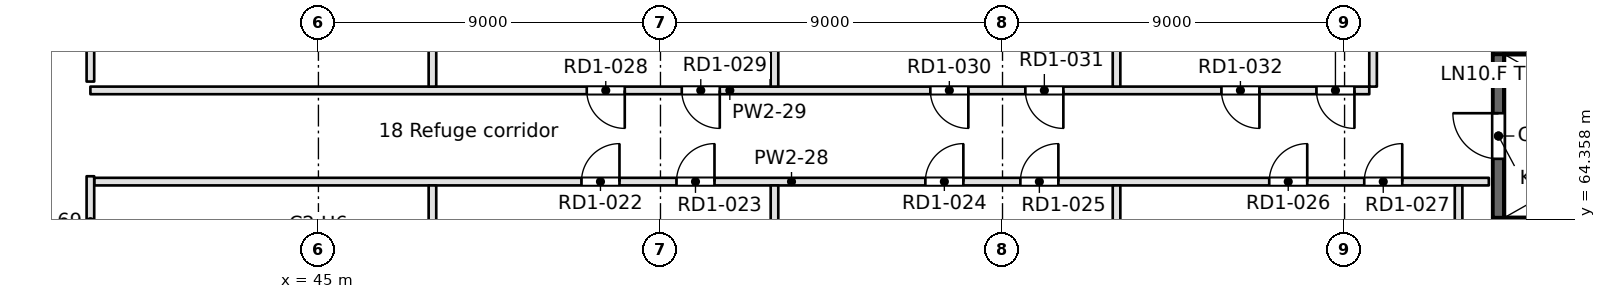
"""IFC4 building model, lengths in metres.
Left out: names, types, materials, properties, quantities, classifications, styles, units other than length and angle.
Written with IfcOpenShell. Run it as: python <this file> out.ifc"""

import sys

from ifc_helpers import new_model, si_unit, direction, frame, frame_2d, origin, place, context, subcontext, project, spatial, rectangle, extrude, element, fill, save


model = new_model("IFC4")
c1 = context("Model", 3, precision=1e-05, world=origin(), true_north=direction((0.0, 1.0)))
c2 = subcontext(c1, "Body", "Model", "MODEL_VIEW")
j1 = project(units=[si_unit("LENGTHUNIT", "METRE"), si_unit("PLANEANGLEUNIT", "RADIAN")], contexts=[c1])
p1 = place(None, origin())
s1 = spatial("IfcSite", under=j1, at=p1, CompositionType="ELEMENT")
p2 = place(p1, origin())
s2 = spatial("IfcBuilding", under=s1, at=p2, CompositionType="ELEMENT")
p3 = place(p2, frame((0.0, 0.0, 31.2)))
s3 = spatial("IfcBuildingStorey", under=s2, at=p3, CompositionType="ELEMENT", Elevation=31.2)
for number, where, z_axis, x_axis in (
    (1, (75.9, 64.25, -0.45), (0.0, 0.0, 1.0), (1.0, 0.0, 0.0)),
    (2, (75.9, 68.85, -0.45), (0.0, 0.0, 1.0), (1.0, 0.0, 0.0)),
):
    element("IfcWall", number, at=place(p3, frame(where, z_axis=z_axis, x_axis=x_axis)), inside=s3, PredefinedType="SOLIDWALL", context=c2, shape_type="SweptSolid", body=[
        extrude(rectangle(XDim=8.2, YDim=0.3, at=frame_2d((4.1, 0.0))), origin(), (0.0, 0.0, 1.0), 4.65),
    ])
p4 = place(p3, frame((76.05, 64.4, -0.45), z_axis=(0.0, 0.0, 1.0), x_axis=(0.0, 1.0, 0.0)))
e3 = element("IfcWall", 3, at=p4, inside=s3, PredefinedType="SOLIDWALL", context=c2, shape_type="SweptSolid", body=[
    extrude(rectangle(XDim=4.3, YDim=0.3, at=frame_2d((2.15, 0.0))), origin(), (0.0, 0.0, 1.0), 4.65),
])
p5 = place(p4, frame((1.55, 0.0, 0.45)))
e4 = element("IfcOpeningElement", 4, at=p5, cuts=e3, PredefinedType="OPENING", context=c2, shape_type="SweptSolid", body=[
    extrude(rectangle(XDim=1.2, YDim=2.1, at=frame_2d((0.6, 1.05))), frame((0.0, 0.15, 0.0), z_axis=(0.0, -1.0, 0.0), x_axis=(1.0, 0.0, 0.0)), (0.0, 0.0, 1.0), 0.3),
])
p6 = place(p3, frame((75.796, 65.35, 0.0), z_axis=(0.0, 0.0, 1.0), x_axis=(-1.0, 0.0, 0.0)))
e5 = element("IfcWall", 5, at=p6, inside=s3, PredefinedType="PARTITIONING", context=c2, shape_type="SweptSolid", body=[
    extrude(rectangle(XDim=36.696, YDim=0.2, at=frame_2d((18.348, 0.0))), origin(), (0.0, 0.0, 1.0), 4.2),
])
p7 = place(p6, frame((22.875, 0.0, 0.0)))
e6 = element("IfcOpeningElement", 6, at=p7, cuts=e5, PredefinedType="OPENING", context=c2, shape_type="SweptSolid", body=[
    extrude(rectangle(XDim=1.0, YDim=2.1, at=frame_2d((0.5, 1.05))), frame((0.0, 0.1, 0.0), z_axis=(0.0, -1.0, 0.0), x_axis=(1.0, 0.0, 0.0)), (0.0, 0.0, 1.0), 0.2),
])
p8 = place(p6, frame((20.375, 0.0, 0.0)))
e7 = element("IfcOpeningElement", 7, at=p8, cuts=e5, PredefinedType="OPENING", context=c2, shape_type="SweptSolid", body=[
    extrude(rectangle(XDim=1.0, YDim=2.1, at=frame_2d((0.5, 1.05))), frame((0.0, 0.1, 0.0), z_axis=(0.0, -1.0, 0.0), x_axis=(1.0, 0.0, 0.0)), (0.0, 0.0, 1.0), 0.2),
])
p9 = place(p6, frame((13.826, 0.0, 0.0)))
e8 = element("IfcOpeningElement", 8, at=p9, cuts=e5, PredefinedType="OPENING", context=c2, shape_type="SweptSolid", body=[
    extrude(rectangle(XDim=1.0, YDim=2.1, at=frame_2d((0.5, 1.05))), frame((0.0, 0.1, 0.0), z_axis=(0.0, -1.0, 0.0), x_axis=(1.0, 0.0, 0.0)), (0.0, 0.0, 1.0), 0.2),
])
p10 = place(p6, frame((11.326, 0.0, 0.0)))
e9 = element("IfcOpeningElement", 9, at=p10, cuts=e5, PredefinedType="OPENING", context=c2, shape_type="SweptSolid", body=[
    extrude(rectangle(XDim=1.0, YDim=2.1, at=frame_2d((0.5, 1.05))), frame((0.0, 0.1, 0.0), z_axis=(0.0, -1.0, 0.0), x_axis=(1.0, 0.0, 0.0)), (0.0, 0.0, 1.0), 0.2),
])
p11 = place(p6, frame((4.778, 0.0, 0.0)))
e10 = element("IfcOpeningElement", 10, at=p11, cuts=e5, PredefinedType="OPENING", context=c2, shape_type="SweptSolid", body=[
    extrude(rectangle(XDim=1.0, YDim=2.1, at=frame_2d((0.5, 1.05))), frame((0.0, 0.1, 0.0), z_axis=(0.0, -1.0, 0.0), x_axis=(1.0, 0.0, 0.0)), (0.0, 0.0, 1.0), 0.2),
])
p12 = place(p6, frame((2.278, 0.0, 0.0)))
e11 = element("IfcOpeningElement", 11, at=p12, cuts=e5, PredefinedType="OPENING", context=c2, shape_type="SweptSolid", body=[
    extrude(rectangle(XDim=1.0, YDim=2.1, at=frame_2d((0.5, 1.05))), frame((0.0, 0.1, 0.0), z_axis=(0.0, -1.0, 0.0), x_axis=(1.0, 0.0, 0.0)), (0.0, 0.0, 1.0), 0.2),
])
p13 = place(p3, frame((39.0, 67.75, 0.0), z_axis=(0.0, 0.0, 1.0), x_axis=(1.0, 0.0, 0.0)))
e12 = element("IfcWall", 12, at=p13, inside=s3, PredefinedType="PARTITIONING", context=c2, shape_type="SweptSolid", body=[
    extrude(rectangle(XDim=33.65, YDim=0.2, at=frame_2d((16.825, 0.0))), origin(), (0.0, 0.0, 1.0), 4.2),
])
p14 = place(p13, frame((13.06, 0.0, 0.0)))
e13 = element("IfcOpeningElement", 13, at=p14, cuts=e12, PredefinedType="OPENING", context=c2, shape_type="SweptSolid", body=[
    extrude(rectangle(XDim=1.0, YDim=2.1, at=frame_2d((0.5, 1.05))), frame((0.0, 0.1, 0.0), z_axis=(0.0, -1.0, 0.0), x_axis=(1.0, 0.0, 0.0)), (0.0, 0.0, 1.0), 0.2),
])
p15 = place(p13, frame((15.56, 0.0, 0.0)))
e14 = element("IfcOpeningElement", 14, at=p15, cuts=e12, PredefinedType="OPENING", context=c2, shape_type="SweptSolid", body=[
    extrude(rectangle(XDim=1.0, YDim=2.1, at=frame_2d((0.5, 1.05))), frame((0.0, 0.1, 0.0), z_axis=(0.0, -1.0, 0.0), x_axis=(1.0, 0.0, 0.0)), (0.0, 0.0, 1.0), 0.2),
])
p16 = place(p13, frame((22.101, 0.0, 0.0)))
e15 = element("IfcOpeningElement", 15, at=p16, cuts=e12, PredefinedType="OPENING", context=c2, shape_type="SweptSolid", body=[
    extrude(rectangle(XDim=1.0, YDim=2.1, at=frame_2d((0.5, 1.05))), frame((0.0, 0.1, 0.0), z_axis=(0.0, -1.0, 0.0), x_axis=(1.0, 0.0, 0.0)), (0.0, 0.0, 1.0), 0.2),
])
p17 = place(p13, frame((24.601, 0.0, 0.0)))
e16 = element("IfcOpeningElement", 16, at=p17, cuts=e12, PredefinedType="OPENING", context=c2, shape_type="SweptSolid", body=[
    extrude(rectangle(XDim=1.0, YDim=2.1, at=frame_2d((0.5, 1.05))), frame((0.0, 0.1, 0.0), z_axis=(0.0, -1.0, 0.0), x_axis=(1.0, 0.0, 0.0)), (0.0, 0.0, 1.0), 0.2),
])
p18 = place(p13, frame((29.76, 0.0, 0.0)))
e17 = element("IfcOpeningElement", 17, at=p18, cuts=e12, PredefinedType="OPENING", context=c2, shape_type="SweptSolid", body=[
    extrude(rectangle(XDim=1.0, YDim=2.1, at=frame_2d((0.5, 1.05))), frame((0.0, 0.1, 0.0), z_axis=(0.0, -1.0, 0.0), x_axis=(1.0, 0.0, 0.0)), (0.0, 0.0, 1.0), 0.2),
])
p19 = place(p13, frame((32.26, 0.0, 0.0)))
e18 = element("IfcOpeningElement", 18, at=p19, cuts=e12, PredefinedType="OPENING", context=c2, shape_type="SweptSolid", body=[
    extrude(rectangle(XDim=1.0, YDim=2.1, at=frame_2d((0.5, 1.05))), frame((0.0, 0.1, 0.0), z_axis=(0.0, -1.0, 0.0), x_axis=(1.0, 0.0, 0.0)), (0.0, 0.0, 1.0), 0.2),
])
p20 = place(p3, frame((39.0, 65.491, 0.0), z_axis=(0.0, 0.0, 1.0), x_axis=(0.0, -1.0, 0.0)))
e19 = element("IfcWall", 19, at=p20, inside=s3, PredefinedType="PARTITIONING", context=c2, shape_type="SweptSolid", body=[
    extrude(rectangle(XDim=2.391, YDim=0.2, at=frame_2d((1.196, 0.0))), origin(), (0.0, 0.0, 1.0), 4.2),
])
p21 = place(p3, frame((39.0, 89.9, 0.0), z_axis=(0.0, 0.0, 1.0), x_axis=(0.0, -1.0, 0.0)))
e20 = element("IfcWall", 20, at=p21, inside=s3, PredefinedType="PARTITIONING", context=c2, shape_type="SweptSolid", body=[
    extrude(rectangle(XDim=21.917, YDim=0.2, at=frame_2d((10.958, 0.0))), origin(), (0.0, 0.0, 1.0), 4.2),
])
p22 = place(p21, frame((15.371, 0.0, 0.0)))
e21 = element("IfcOpeningElement", 21, at=p22, cuts=e20, PredefinedType="OPENING", context=c2, shape_type="SweptSolid", body=[
    extrude(rectangle(XDim=1.0, YDim=2.1, at=frame_2d((0.5, 1.05))), frame((0.0, 0.1, 0.0), z_axis=(0.0, -1.0, 0.0), x_axis=(1.0, 0.0, 0.0)), (0.0, 0.0, 1.0), 0.2),
])
p23 = place(p21, frame((12.871, 0.0, 0.0)))
e22 = element("IfcOpeningElement", 22, at=p23, cuts=e20, PredefinedType="OPENING", context=c2, shape_type="SweptSolid", body=[
    extrude(rectangle(XDim=1.0, YDim=2.1, at=frame_2d((0.5, 1.05))), frame((0.0, 0.1, 0.0), z_axis=(0.0, -1.0, 0.0), x_axis=(1.0, 0.0, 0.0)), (0.0, 0.0, 1.0), 0.2),
])
p24 = place(p21, frame((3.531, 0.0, 0.0)))
e23 = element("IfcOpeningElement", 23, at=p24, cuts=e20, PredefinedType="OPENING", context=c2, shape_type="SweptSolid", body=[
    extrude(rectangle(XDim=1.0, YDim=2.1, at=frame_2d((0.5, 1.05))), frame((0.0, 0.1, 0.0), z_axis=(0.0, -1.0, 0.0), x_axis=(1.0, 0.0, 0.0)), (0.0, 0.0, 1.0), 0.2),
])
p25 = place(p21, frame((1.031, 0.0, 0.0)))
e24 = element("IfcOpeningElement", 24, at=p25, cuts=e20, PredefinedType="OPENING", context=c2, shape_type="SweptSolid", body=[
    extrude(rectangle(XDim=1.0, YDim=2.1, at=frame_2d((0.5, 1.05))), frame((0.0, 0.1, 0.0), z_axis=(0.0, -1.0, 0.0), x_axis=(1.0, 0.0, 0.0)), (0.0, 0.0, 1.0), 0.2),
])
p26 = place(p3, frame((48.0, 65.25, 0.0), z_axis=(0.0, 0.0, 1.0), x_axis=(0.0, -1.0, 0.0)))
e25 = element("IfcWall", 25, at=p26, inside=s3, PredefinedType="PARTITIONING", context=c2, shape_type="SweptSolid", body=[
    extrude(rectangle(XDim=8.795, YDim=0.2, at=frame_2d((4.397, 0.0))), origin(), (0.0, 0.0, 1.0), 4.2),
])
p27 = place(p3, frame((48.0, 80.0, 0.0), z_axis=(0.0, 0.0, 1.0), x_axis=(0.0, -1.0, 0.0)))
e26 = element("IfcWall", 26, at=p27, inside=s3, PredefinedType="PARTITIONING", context=c2, shape_type="SweptSolid", body=[
    extrude(rectangle(XDim=12.15, YDim=0.2, at=frame_2d((6.075, 0.0))), origin(), (0.0, 0.0, 1.0), 4.2),
])
p28 = place(p3, frame((57.0, 65.25, 0.0), z_axis=(0.0, 0.0, 1.0), x_axis=(0.0, -1.0, 0.0)))
e27 = element("IfcWall", 27, at=p28, inside=s3, PredefinedType="PARTITIONING", context=c2, shape_type="SweptSolid", body=[
    extrude(rectangle(XDim=8.795, YDim=0.2, at=frame_2d((4.397, 0.0))), origin(), (0.0, 0.0, 1.0), 4.2),
])
p29 = place(p3, frame((57.0, 80.0, 0.0), z_axis=(0.0, 0.0, 1.0), x_axis=(0.0, -1.0, 0.0)))
e28 = element("IfcWall", 28, at=p29, inside=s3, PredefinedType="PARTITIONING", context=c2, shape_type="SweptSolid", body=[
    extrude(rectangle(XDim=12.15, YDim=0.2, at=frame_2d((6.075, 0.0))), origin(), (0.0, 0.0, 1.0), 4.2),
])
p30 = place(p3, frame((66.0, 65.25, 0.0), z_axis=(0.0, 0.0, 1.0), x_axis=(0.0, -1.0, 0.0)))
e29 = element("IfcWall", 29, at=p30, inside=s3, PredefinedType="PARTITIONING", context=c2, shape_type="SweptSolid", body=[
    extrude(rectangle(XDim=8.795, YDim=0.2, at=frame_2d((4.397, 0.0))), origin(), (0.0, 0.0, 1.0), 4.2),
])
p31 = place(p3, frame((66.0, 80.0, 0.0), z_axis=(0.0, 0.0, 1.0), x_axis=(0.0, -1.0, 0.0)))
e30 = element("IfcWall", 30, at=p31, inside=s3, PredefinedType="PARTITIONING", context=c2, shape_type="SweptSolid", body=[
    extrude(rectangle(XDim=12.15, YDim=0.2, at=frame_2d((6.075, 0.0))), origin(), (0.0, 0.0, 1.0), 4.2),
])
p32 = place(p3, frame((72.75, 67.85, 0.0), z_axis=(0.0, 0.0, 1.0), x_axis=(0.0, 1.0, 0.0)))
e31 = element("IfcWall", 31, at=p32, inside=s3, PredefinedType="PARTITIONING", context=c2, shape_type="SweptSolid", body=[
    extrude(rectangle(XDim=3.45, YDim=0.2, at=frame_2d((1.725, 0.0))), origin(), (0.0, 0.0, 1.0), 4.2),
])
p33 = place(p3, frame((75.0, 65.25, 0.0), z_axis=(0.0, 0.0, 1.0), x_axis=(0.0, -1.0, 0.0)))
e32 = element("IfcWall", 32, at=p33, inside=s3, PredefinedType="PARTITIONING", context=c2, shape_type="SweptSolid", body=[
    extrude(rectangle(XDim=8.795, YDim=0.2, at=frame_2d((4.397, 0.0))), origin(), (0.0, 0.0, 1.0), 4.2),
])
p34 = place(p5, origin())
e33 = element("IfcDoor", 33, at=p34, inside=s3, OperationType="SINGLE_SWING_RIGHT", PredefinedType="DOOR", context=c2, shape_type="SweptSolid", body=[
    extrude(rectangle(XDim=1.2, YDim=2.1, at=frame_2d((0.6, 1.05))), frame((0.0, 0.025, 0.0), z_axis=(0.0, -1.0, 0.0), x_axis=(1.0, 0.0, 0.0)), (0.0, 0.0, 1.0), 0.05),
])
fill(e4, e33)
p35 = place(p7, frame((1.0, 0.0, 0.0), z_axis=(0.0, 0.0, 1.0), x_axis=(-1.0, 0.0, 0.0)))
e34 = element("IfcDoor", 34, at=p35, inside=s3, OperationType="SINGLE_SWING_RIGHT", PredefinedType="DOOR", context=c2, shape_type="SweptSolid", body=[
    extrude(rectangle(XDim=1.0, YDim=2.1, at=frame_2d((0.5, 1.05))), frame((0.0, 0.025, 0.0), z_axis=(0.0, -1.0, 0.0), x_axis=(1.0, 0.0, 0.0)), (0.0, 0.0, 1.0), 0.05),
])
fill(e6, e34)
p36 = place(p8, frame((1.0, 0.0, 0.0), z_axis=(0.0, 0.0, 1.0), x_axis=(-1.0, 0.0, 0.0)))
e35 = element("IfcDoor", 35, at=p36, inside=s3, OperationType="SINGLE_SWING_RIGHT", PredefinedType="DOOR", context=c2, shape_type="SweptSolid", body=[
    extrude(rectangle(XDim=1.0, YDim=2.1, at=frame_2d((0.5, 1.05))), frame((0.0, 0.025, 0.0), z_axis=(0.0, -1.0, 0.0), x_axis=(1.0, 0.0, 0.0)), (0.0, 0.0, 1.0), 0.05),
])
fill(e7, e35)
p37 = place(p9, frame((1.0, 0.0, 0.0), z_axis=(0.0, 0.0, 1.0), x_axis=(-1.0, 0.0, 0.0)))
e36 = element("IfcDoor", 36, at=p37, inside=s3, OperationType="SINGLE_SWING_RIGHT", PredefinedType="DOOR", context=c2, shape_type="SweptSolid", body=[
    extrude(rectangle(XDim=1.0, YDim=2.1, at=frame_2d((0.5, 1.05))), frame((0.0, 0.025, 0.0), z_axis=(0.0, -1.0, 0.0), x_axis=(1.0, 0.0, 0.0)), (0.0, 0.0, 1.0), 0.05),
])
fill(e8, e36)
p38 = place(p10, frame((1.0, 0.0, 0.0), z_axis=(0.0, 0.0, 1.0), x_axis=(-1.0, 0.0, 0.0)))
e37 = element("IfcDoor", 37, at=p38, inside=s3, OperationType="SINGLE_SWING_RIGHT", PredefinedType="DOOR", context=c2, shape_type="SweptSolid", body=[
    extrude(rectangle(XDim=1.0, YDim=2.1, at=frame_2d((0.5, 1.05))), frame((0.0, 0.025, 0.0), z_axis=(0.0, -1.0, 0.0), x_axis=(1.0, 0.0, 0.0)), (0.0, 0.0, 1.0), 0.05),
])
fill(e9, e37)
p39 = place(p11, frame((1.0, 0.0, 0.0), z_axis=(0.0, 0.0, 1.0), x_axis=(-1.0, 0.0, 0.0)))
e38 = element("IfcDoor", 38, at=p39, inside=s3, OperationType="SINGLE_SWING_RIGHT", PredefinedType="DOOR", context=c2, shape_type="SweptSolid", body=[
    extrude(rectangle(XDim=1.0, YDim=2.1, at=frame_2d((0.5, 1.05))), frame((0.0, 0.025, 0.0), z_axis=(0.0, -1.0, 0.0), x_axis=(1.0, 0.0, 0.0)), (0.0, 0.0, 1.0), 0.05),
])
fill(e10, e38)
p40 = place(p12, frame((1.0, 0.0, 0.0), z_axis=(0.0, 0.0, 1.0), x_axis=(-1.0, 0.0, 0.0)))
e39 = element("IfcDoor", 39, at=p40, inside=s3, OperationType="SINGLE_SWING_RIGHT", PredefinedType="DOOR", context=c2, shape_type="SweptSolid", body=[
    extrude(rectangle(XDim=1.0, YDim=2.1, at=frame_2d((0.5, 1.05))), frame((0.0, 0.025, 0.0), z_axis=(0.0, -1.0, 0.0), x_axis=(1.0, 0.0, 0.0)), (0.0, 0.0, 1.0), 0.05),
])
fill(e11, e39)
p41 = place(p14, frame((1.0, 0.0, 0.0), z_axis=(0.0, 0.0, 1.0), x_axis=(-1.0, 0.0, 0.0)))
e40 = element("IfcDoor", 40, at=p41, inside=s3, OperationType="SINGLE_SWING_LEFT", PredefinedType="DOOR", context=c2, shape_type="SweptSolid", body=[
    extrude(rectangle(XDim=1.0, YDim=2.1, at=frame_2d((0.5, 1.05))), frame((0.0, 0.025, 0.0), z_axis=(0.0, -1.0, 0.0), x_axis=(1.0, 0.0, 0.0)), (0.0, 0.0, 1.0), 0.05),
])
fill(e13, e40)
p42 = place(p15, frame((1.0, 0.0, 0.0), z_axis=(0.0, 0.0, 1.0), x_axis=(-1.0, 0.0, 0.0)))
e41 = element("IfcDoor", 41, at=p42, inside=s3, OperationType="SINGLE_SWING_LEFT", PredefinedType="DOOR", context=c2, shape_type="SweptSolid", body=[
    extrude(rectangle(XDim=1.0, YDim=2.1, at=frame_2d((0.5, 1.05))), frame((0.0, 0.025, 0.0), z_axis=(0.0, -1.0, 0.0), x_axis=(1.0, 0.0, 0.0)), (0.0, 0.0, 1.0), 0.05),
])
fill(e14, e41)
p43 = place(p16, frame((1.0, 0.0, 0.0), z_axis=(0.0, 0.0, 1.0), x_axis=(-1.0, 0.0, 0.0)))
e42 = element("IfcDoor", 42, at=p43, inside=s3, OperationType="SINGLE_SWING_LEFT", PredefinedType="DOOR", context=c2, shape_type="SweptSolid", body=[
    extrude(rectangle(XDim=1.0, YDim=2.1, at=frame_2d((0.5, 1.05))), frame((0.0, 0.025, 0.0), z_axis=(0.0, -1.0, 0.0), x_axis=(1.0, 0.0, 0.0)), (0.0, 0.0, 1.0), 0.05),
])
fill(e15, e42)
p44 = place(p17, frame((1.0, 0.0, 0.0), z_axis=(0.0, 0.0, 1.0), x_axis=(-1.0, 0.0, 0.0)))
e43 = element("IfcDoor", 43, at=p44, inside=s3, OperationType="SINGLE_SWING_LEFT", PredefinedType="DOOR", context=c2, shape_type="SweptSolid", body=[
    extrude(rectangle(XDim=1.0, YDim=2.1, at=frame_2d((0.5, 1.05))), frame((0.0, 0.025, 0.0), z_axis=(0.0, -1.0, 0.0), x_axis=(1.0, 0.0, 0.0)), (0.0, 0.0, 1.0), 0.05),
])
fill(e16, e43)
p45 = place(p18, frame((1.0, 0.0, 0.0), z_axis=(0.0, 0.0, 1.0), x_axis=(-1.0, 0.0, 0.0)))
e44 = element("IfcDoor", 44, at=p45, inside=s3, OperationType="SINGLE_SWING_LEFT", PredefinedType="DOOR", context=c2, shape_type="SweptSolid", body=[
    extrude(rectangle(XDim=1.0, YDim=2.1, at=frame_2d((0.5, 1.05))), frame((0.0, 0.025, 0.0), z_axis=(0.0, -1.0, 0.0), x_axis=(1.0, 0.0, 0.0)), (0.0, 0.0, 1.0), 0.05),
])
fill(e17, e44)
p46 = place(p19, frame((1.0, 0.0, 0.0), z_axis=(0.0, 0.0, 1.0), x_axis=(-1.0, 0.0, 0.0)))
e45 = element("IfcDoor", 45, at=p46, inside=s3, OperationType="SINGLE_SWING_LEFT", PredefinedType="DOOR", context=c2, shape_type="SweptSolid", body=[
    extrude(rectangle(XDim=1.0, YDim=2.1, at=frame_2d((0.5, 1.05))), frame((0.0, 0.025, 0.0), z_axis=(0.0, -1.0, 0.0), x_axis=(1.0, 0.0, 0.0)), (0.0, 0.0, 1.0), 0.05),
])
fill(e18, e45)
save(model, sys.argv[1])
